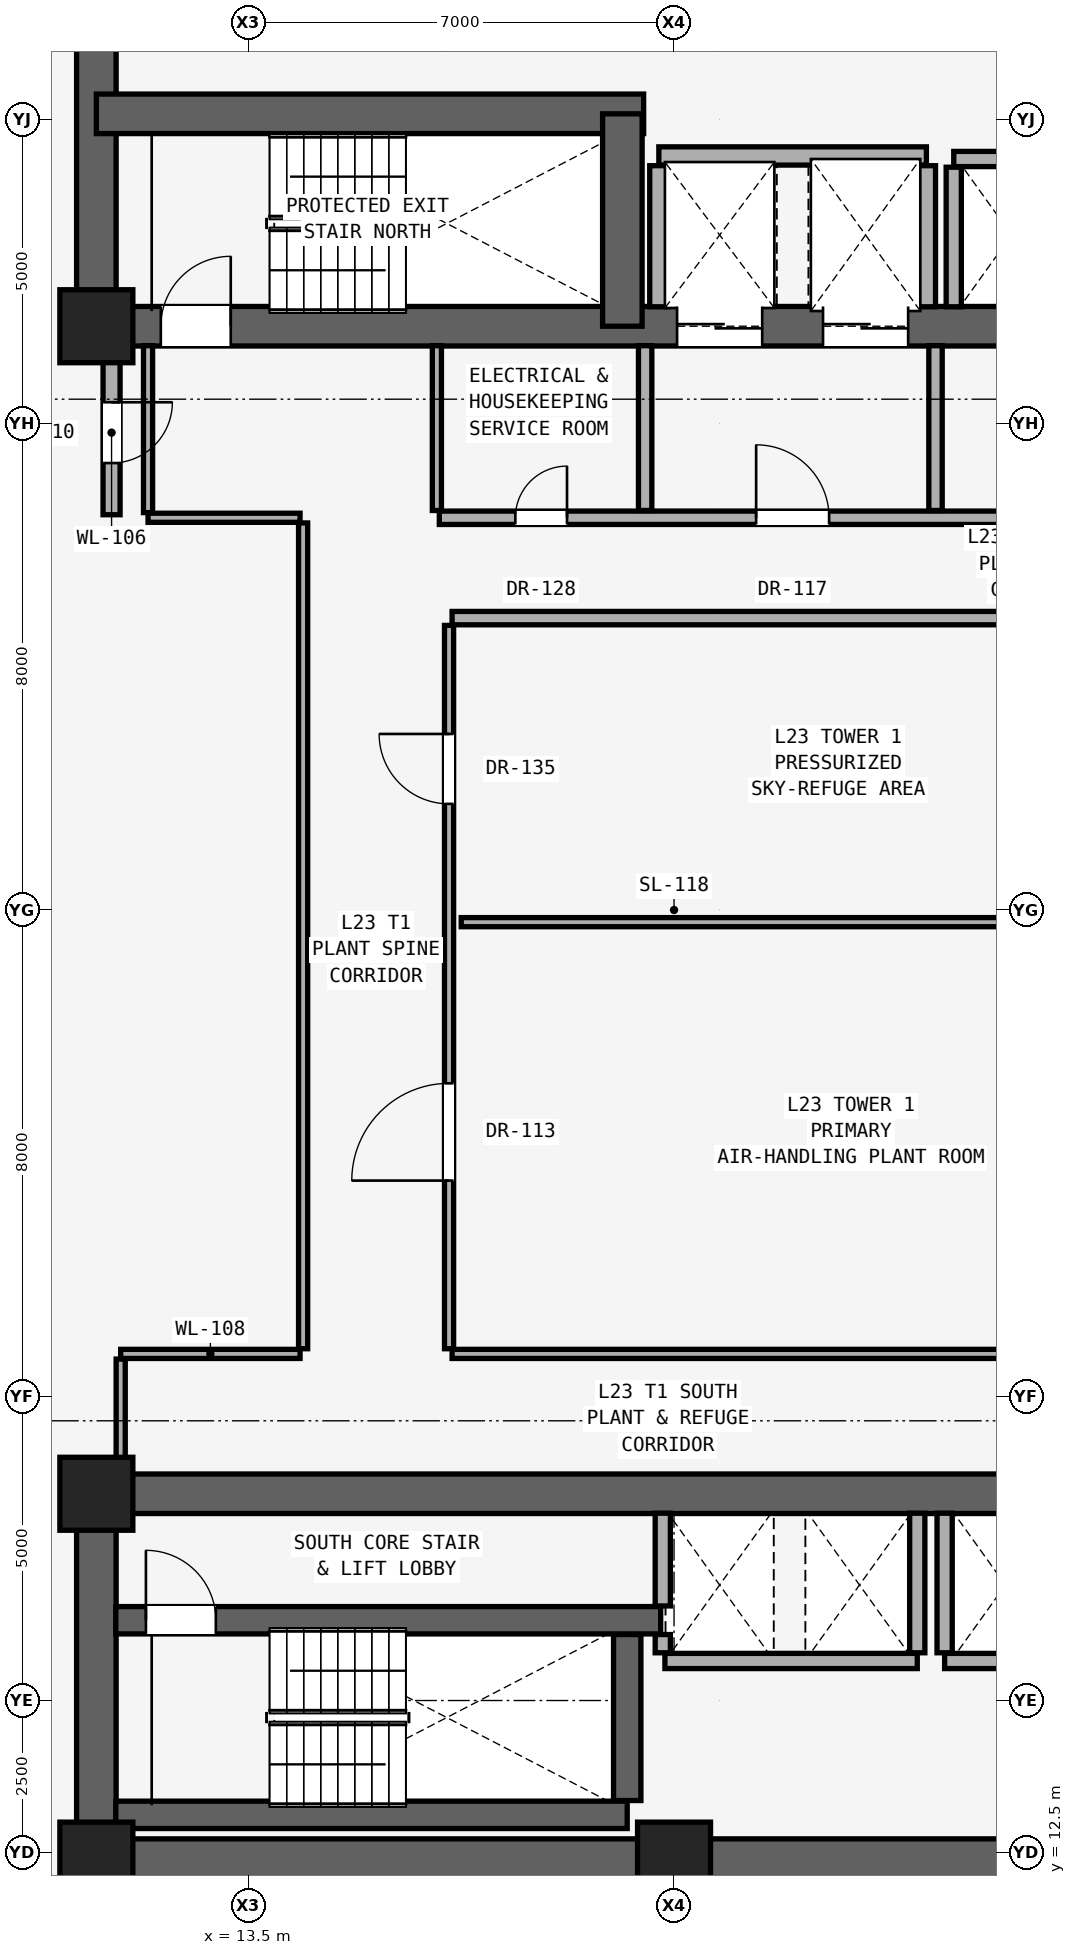
"""IFC4 building model, lengths in metres.
Left out: names, types, materials, properties, quantities, classifications, styles, units other than length and angle.
Written with IfcOpenShell. Run it as: python <this file> out.ifc"""

import sys

from ifc_helpers import new_model, si_unit, direction, frame, frame_2d, origin, origin_2d, place, context, subcontext, project, spatial, rectangle, extrude, element, fill, save


model = new_model("IFC4")
c1 = context("Model", 3, precision=1e-05, world=origin(), true_north=direction((0.0, 1.0)))
c2 = subcontext(c1, "Body", "Model", "MODEL_VIEW")
j1 = project(units=[si_unit("LENGTHUNIT", "METRE"), si_unit("PLANEANGLEUNIT", "RADIAN")], contexts=[c1])
p1 = place(None, origin())
s1 = spatial("IfcSite", under=j1, at=p1, CompositionType="ELEMENT")
p2 = place(p1, origin())
s2 = spatial("IfcBuilding", under=s1, at=p2, CompositionType="ELEMENT")
p3 = place(p2, frame((0.0, 0.0, 81.8)))
s3 = spatial("IfcBuildingStorey", under=s2, at=p3, CompositionType="ELEMENT", Elevation=81.8)
for number, where, z_axis, x_axis in (
    (1, (11.0, 12.4, 0.0), (0.0, 0.0, 1.0), (1.0, 0.0, 0.0)),
    (2, (20.5, 12.4, 0.0), (0.0, 0.0, 1.0), (1.0, 0.0, 0.0)),
    (3, (11.0, 18.4, 0.0), (0.0, 0.0, 1.0), (1.0, 0.0, 0.0)),
    (4, (11.0, 37.6, 0.0), (0.0, 0.0, 1.0), (1.0, 0.0, 0.0)),
):
    element("IfcColumn", number, at=place(p3, frame(where, z_axis=z_axis, x_axis=x_axis)), inside=s3, PredefinedType="COLUMN", context=c2, shape_type="SweptSolid", body=[
        extrude(rectangle(XDim=1.2, YDim=1.2, at=origin_2d()), origin(), (0.0, 0.0, 1.0), 6.6),
    ])
p4 = place(p3, frame((11.0, 37.6, 0.0), z_axis=(0.0, 0.0, 1.0), x_axis=(0.0, 1.0, 0.0)))
e5 = element("IfcWall", 5, at=p4, inside=s3, PredefinedType="SHEAR", context=c2, shape_type="SweptSolid", body=[
    extrude(rectangle(XDim=6.0, YDim=0.65, at=frame_2d((3.0, 0.0))), origin(), (0.0, 0.0, 1.0), 6.38),
])
p5 = place(p3, frame((11.0, 37.6, 0.0), z_axis=(0.0, 0.0, 1.0), x_axis=(1.0, 0.0, 0.0)))
e6 = element("IfcWall", 6, at=p5, inside=s3, PredefinedType="SHEAR", context=c2, shape_type="SweptSolid", body=[
    extrude(rectangle(XDim=19.0, YDim=0.65, at=frame_2d((9.5, 0.0))), origin(), (0.0, 0.0, 1.0), 6.38),
])
p6 = place(p5, frame((1.06, 0.0, 0.0)))
e7 = element("IfcOpeningElement", 7, at=p6, cuts=e6, PredefinedType="OPENING", context=c2, shape_type="SweptSolid", body=[
    extrude(rectangle(XDim=1.15, YDim=2.2, at=frame_2d((0.575, 1.1))), frame((0.0, 0.335, 0.0), z_axis=(0.0, -1.0, 0.0), x_axis=(1.0, 0.0, 0.0)), (0.0, 0.0, 1.0), 0.67),
])
p7 = place(p5, frame((9.55, 0.0, 0.0)))
e8 = element("IfcOpeningElement", 8, at=p7, cuts=e6, PredefinedType="OPENING", context=c2, shape_type="SweptSolid", body=[
    extrude(rectangle(XDim=1.4, YDim=2.35, at=frame_2d((0.7, 1.175))), frame((0.0, 0.335, 0.0), z_axis=(0.0, -1.0, 0.0), x_axis=(1.0, 0.0, 0.0)), (0.0, 0.0, 1.0), 0.67),
])
p8 = place(p5, frame((11.95, 0.0, 0.0)))
e9 = element("IfcOpeningElement", 9, at=p8, cuts=e6, PredefinedType="OPENING", context=c2, shape_type="SweptSolid", body=[
    extrude(rectangle(XDim=1.4, YDim=2.35, at=frame_2d((0.7, 1.175))), frame((0.0, 0.335, 0.0), z_axis=(0.0, -1.0, 0.0), x_axis=(1.0, 0.0, 0.0)), (0.0, 0.0, 1.0), 0.67),
])
p9 = place(p3, frame((11.0, 41.093, 0.0), z_axis=(0.0, 0.0, 1.0), x_axis=(1.0, 0.0, 0.0)))
e10 = element("IfcWall", 10, at=p9, inside=s3, PredefinedType="SHEAR", context=c2, shape_type="SweptSolid", body=[
    extrude(rectangle(XDim=9.0, YDim=0.65, at=frame_2d((4.5, 0.0))), origin(), (0.0, 0.0, 1.0), 6.38),
])
p10 = place(p3, frame((19.65, 37.6, 0.0), z_axis=(0.0, 0.0, 1.0), x_axis=(0.0, 1.0, 0.0)))
e11 = element("IfcWall", 11, at=p10, inside=s3, PredefinedType="SHEAR", context=c2, shape_type="SweptSolid", body=[
    extrude(rectangle(XDim=3.493, YDim=0.65, at=frame_2d((1.747, 0.0))), origin(), (0.0, 0.0, 1.0), 6.38),
])
p11 = place(p3, frame((11.0, 12.4, 0.0), z_axis=(0.0, 0.0, 1.0), x_axis=(1.0, 0.0, 0.0)))
e12 = element("IfcWall", 12, at=p11, inside=s3, PredefinedType="SHEAR", context=c2, shape_type="SweptSolid", body=[
    extrude(rectangle(XDim=19.0, YDim=0.65, at=frame_2d((9.5, 0.0))), origin(), (0.0, 0.0, 1.0), 6.38),
])
p12 = place(p3, frame((11.0, 12.4, 0.0), z_axis=(0.0, 0.0, 1.0), x_axis=(0.0, 1.0, 0.0)))
e13 = element("IfcWall", 13, at=p12, inside=s3, PredefinedType="SHEAR", context=c2, shape_type="SweptSolid", body=[
    extrude(rectangle(XDim=6.0, YDim=0.65, at=frame_2d((3.0, 0.0))), origin(), (0.0, 0.0, 1.0), 6.38),
])
p13 = place(p3, frame((11.0, 18.4, 0.0), z_axis=(0.0, 0.0, 1.0), x_axis=(1.0, 0.0, 0.0)))
e14 = element("IfcWall", 14, at=p13, inside=s3, PredefinedType="SHEAR", context=c2, shape_type="SweptSolid", body=[
    extrude(rectangle(XDim=19.0, YDim=0.65, at=frame_2d((9.5, 0.0))), origin(), (0.0, 0.0, 1.0), 6.38),
])
p14 = place(p3, frame((11.25, 37.2, 0.0), z_axis=(0.0, 0.0, 1.0), x_axis=(0.0, -1.0, 0.0)))
e15 = element("IfcWall", 15, at=p14, inside=s3, PredefinedType="SOLIDWALL", context=c2, shape_type="SweptSolid", body=[
    extrude(rectangle(XDim=2.7, YDim=0.28, at=frame_2d((1.35, 0.0))), origin(), (0.0, 0.0, 1.0), 4.93),
])
p15 = place(p14, frame((0.85, 0.0, 0.0)))
e16 = element("IfcOpeningElement", 16, at=p15, cuts=e15, PredefinedType="OPENING", context=c2, shape_type="SweptSolid", body=[
    extrude(rectangle(XDim=1.0, YDim=2.15, at=frame_2d((0.5, 1.075))), frame((0.0, 0.15, 0.0), z_axis=(0.0, -1.0, 0.0), x_axis=(1.0, 0.0, 0.0)), (0.0, 0.0, 1.0), 0.3),
])
p16 = place(p3, frame((11.32, 13.12, 0.0), z_axis=(0.0, 0.0, 1.0), x_axis=(1.0, 0.0, 0.0)))
e17 = element("IfcWall", 17, at=p16, inside=s3, PredefinedType="SHEAR", context=c2, shape_type="SweptSolid", body=[
    extrude(rectangle(XDim=8.41, YDim=0.45, at=frame_2d((4.205, 0.0))), origin(), (0.0, 0.0, 1.0), 6.38),
])
p17 = place(p3, frame((20.35, 15.65, 0.0), z_axis=(0.0, 0.0, 1.0), x_axis=(1.0, 0.0, 0.0)))
e18 = element("IfcWall", 18, at=p17, inside=s3, PredefinedType="SOLIDWALL", context=c2, shape_type="SweptSolid", body=[
    extrude(rectangle(XDim=4.15, YDim=0.25, at=frame_2d((2.075, 0.0))), origin(), (0.0, 0.0, 1.0), 6.38),
])
p18 = place(p3, frame((24.95, 15.65, 0.0), z_axis=(0.0, 0.0, 1.0), x_axis=(1.0, 0.0, 0.0)))
e19 = element("IfcWall", 19, at=p18, inside=s3, PredefinedType="SOLIDWALL", context=c2, shape_type="SweptSolid", body=[
    extrude(rectangle(XDim=4.25, YDim=0.25, at=frame_2d((2.125, 0.0))), origin(), (0.0, 0.0, 1.0), 6.38),
])
p19 = place(p3, frame((11.32, 16.32, 0.0), z_axis=(0.0, 0.0, 1.0), x_axis=(1.0, 0.0, 0.0)))
e20 = element("IfcWall", 20, at=p19, inside=s3, PredefinedType="SHEAR", context=c2, shape_type="SweptSolid", body=[
    extrude(rectangle(XDim=8.96, YDim=0.45, at=frame_2d((4.48, 0.0))), origin(), (0.0, 0.0, 1.0), 6.38),
])
p20 = place(p19, frame((0.495, 0.0, 0.0)))
e21 = element("IfcOpeningElement", 21, at=p20, cuts=e20, PredefinedType="OPENING", context=c2, shape_type="SweptSolid", body=[
    extrude(rectangle(XDim=1.15, YDim=2.2, at=frame_2d((0.575, 1.1))), frame((0.0, 0.235, 0.0), z_axis=(0.0, -1.0, 0.0), x_axis=(1.0, 0.0, 0.0)), (0.0, 0.0, 1.0), 0.47),
])
p21 = place(p3, frame((11.4, 20.7, 0.0), z_axis=(0.0, 0.0, 1.0), x_axis=(1.0, 0.0, 0.0)))
e22 = element("IfcWall", 22, at=p21, inside=s3, PredefinedType="PARTITIONING", context=c2, shape_type="SweptSolid", body=[
    extrude(rectangle(XDim=2.95, YDim=0.15, at=frame_2d((1.475, 0.0))), origin(), (0.0, 0.0, 1.0), 6.38),
])
p22 = place(p3, frame((16.85, 20.7, 0.0), z_axis=(0.0, 0.0, 1.0), x_axis=(1.0, 0.0, 0.0)))
e23 = element("IfcWall", 23, at=p22, inside=s3, PredefinedType="PARTITIONING", context=c2, shape_type="SweptSolid", body=[
    extrude(rectangle(XDim=12.55, YDim=0.15, at=frame_2d((6.275, 0.0))), origin(), (0.0, 0.0, 1.0), 5.909),
])
p23 = place(p3, frame((17.0, 27.8, 0.0), z_axis=(0.0, 0.0, 1.0), x_axis=(1.0, 0.0, 0.0)))
e24 = element("IfcWall", 24, at=p23, inside=s3, PredefinedType="PARTITIONING", context=c2, shape_type="SweptSolid", body=[
    extrude(rectangle(XDim=12.4, YDim=0.15, at=frame_2d((6.2, 0.0))), origin(), (0.0, 0.0, 1.0), 5.909),
])
p24 = place(p3, frame((16.85, 32.8, 0.0), z_axis=(0.0, 0.0, 1.0), x_axis=(1.0, 0.0, 0.0)))
e25 = element("IfcWall", 25, at=p24, inside=s3, PredefinedType="SOLIDWALL", context=c2, shape_type="SweptSolid", body=[
    extrude(rectangle(XDim=12.55, YDim=0.22, at=frame_2d((6.275, 0.0))), origin(), (0.0, 0.0, 1.0), 5.909),
])
p25 = place(p3, frame((11.85, 34.45, 0.0), z_axis=(0.0, 0.0, 1.0), x_axis=(1.0, 0.0, 0.0)))
e26 = element("IfcWall", 26, at=p25, inside=s3, PredefinedType="PARTITIONING", context=c2, shape_type="SweptSolid", body=[
    extrude(rectangle(XDim=2.5, YDim=0.15, at=frame_2d((1.25, 0.0))), origin(), (0.0, 0.0, 1.0), 6.38),
])
p26 = place(p3, frame((16.64, 34.45, 0.0), z_axis=(0.0, 0.0, 1.0), x_axis=(1.0, 0.0, 0.0)))
e27 = element("IfcWall", 27, at=p26, inside=s3, PredefinedType="SOLIDWALL", context=c2, shape_type="SweptSolid", body=[
    extrude(rectangle(XDim=12.76, YDim=0.22, at=frame_2d((6.38, 0.0))), origin(), (0.0, 0.0, 1.0), 5.909),
])
p27 = place(p26, frame((5.21, 0.0, 0.0)))
e28 = element("IfcOpeningElement", 28, at=p27, cuts=e27, PredefinedType="OPENING", context=c2, shape_type="SweptSolid", body=[
    extrude(rectangle(XDim=1.2, YDim=2.25, at=frame_2d((0.6, 1.125))), frame((0.0, 0.12, 0.0), z_axis=(0.0, -1.0, 0.0), x_axis=(1.0, 0.0, 0.0)), (0.0, 0.0, 1.0), 0.24),
])
p28 = place(p26, frame((1.25, 0.0, 0.0)))
e29 = element("IfcOpeningElement", 29, at=p28, cuts=e27, PredefinedType="OPENING", context=c2, shape_type="SweptSolid", body=[
    extrude(rectangle(XDim=0.85, YDim=2.01, at=frame_2d((0.425, 1.005))), frame((0.0, 0.12, 0.0), z_axis=(0.0, -1.0, 0.0), x_axis=(1.0, 0.0, 0.0)), (0.0, 0.0, 1.0), 0.24),
])
p29 = place(p3, frame((25.1, 40.35, 0.0), z_axis=(0.0, 0.0, 1.0), x_axis=(1.0, 0.0, 0.0)))
e30 = element("IfcWall", 30, at=p29, inside=s3, PredefinedType="SOLIDWALL", context=c2, shape_type="SweptSolid", body=[
    extrude(rectangle(XDim=4.1, YDim=0.25, at=frame_2d((2.05, 0.0))), origin(), (0.0, 0.0, 1.0), 6.38),
])
p30 = place(p3, frame((20.25, 40.4, 0.0), z_axis=(0.0, 0.0, 1.0), x_axis=(1.0, 0.0, 0.0)))
e31 = element("IfcWall", 31, at=p30, inside=s3, PredefinedType="SOLIDWALL", context=c2, shape_type="SweptSolid", body=[
    extrude(rectangle(XDim=4.4, YDim=0.3, at=frame_2d((2.2, 0.0))), origin(), (0.0, 0.0, 1.0), 6.38),
])
p31 = place(p3, frame((11.4, 18.72, 0.0), z_axis=(0.0, 0.0, 1.0), x_axis=(0.0, 1.0, 0.0)))
e32 = element("IfcWall", 32, at=p31, inside=s3, PredefinedType="PARTITIONING", context=c2, shape_type="SweptSolid", body=[
    extrude(rectangle(XDim=1.895, YDim=0.15, at=frame_2d((0.948, 0.0))), origin(), (0.0, 0.0, 1.0), 6.38),
])
p32 = place(p3, frame((11.85, 34.535, 0.0), z_axis=(0.0, 0.0, 1.0), x_axis=(0.0, 1.0, 0.0)))
e33 = element("IfcWall", 33, at=p32, inside=s3, PredefinedType="PARTITIONING", context=c2, shape_type="SweptSolid", body=[
    extrude(rectangle(XDim=2.745, YDim=0.15, at=frame_2d((1.373, 0.0))), origin(), (0.0, 0.0, 1.0), 6.38),
])
p33 = place(p3, frame((14.4, 20.785, 0.0), z_axis=(0.0, 0.0, 1.0), x_axis=(0.0, 1.0, 0.0)))
e34 = element("IfcWall", 34, at=p33, inside=s3, PredefinedType="PARTITIONING", context=c2, shape_type="SweptSolid", body=[
    extrude(rectangle(XDim=13.58, YDim=0.15, at=frame_2d((6.79, 0.0))), origin(), (0.0, 0.0, 1.0), 5.424),
])
p34 = place(p3, frame((16.6, 34.57, 0.0), z_axis=(0.0, 0.0, 1.0), x_axis=(0.0, 1.0, 0.0)))
e35 = element("IfcWall", 35, at=p34, inside=s3, PredefinedType="PARTITIONING", context=c2, shape_type="SweptSolid", body=[
    extrude(rectangle(XDim=2.71, YDim=0.15, at=frame_2d((1.355, 0.0))), origin(), (0.0, 0.0, 1.0), 6.38),
])
p35 = place(p3, frame((16.8, 20.785, 0.0), z_axis=(0.0, 0.0, 1.0), x_axis=(0.0, 1.0, 0.0)))
e36 = element("IfcWall", 36, at=p35, inside=s3, PredefinedType="PARTITIONING", context=c2, shape_type="SweptSolid", body=[
    extrude(rectangle(XDim=11.895, YDim=0.15, at=frame_2d((5.948, 0.0))), origin(), (0.0, 0.0, 1.0), 5.424),
])
p36 = place(p35, frame((8.96, 0.0, 0.0)))
e37 = element("IfcOpeningElement", 37, at=p36, cuts=e36, PredefinedType="OPENING", context=c2, shape_type="SweptSolid", body=[
    extrude(rectangle(XDim=1.15, YDim=2.2, at=frame_2d((0.575, 1.1))), frame((0.0, 0.085, 0.0), z_axis=(0.0, -1.0, 0.0), x_axis=(1.0, 0.0, 0.0)), (0.0, 0.0, 1.0), 0.17),
])
p37 = place(p35, frame((2.765, 0.0, 0.0)))
e38 = element("IfcOpeningElement", 38, at=p37, cuts=e36, PredefinedType="OPENING", context=c2, shape_type="SweptSolid", body=[
    extrude(rectangle(XDim=1.6, YDim=2.3, at=frame_2d((0.8, 1.15))), frame((0.0, 0.085, 0.0), z_axis=(0.0, -1.0, 0.0), x_axis=(1.0, 0.0, 0.0)), (0.0, 0.0, 1.0), 0.17),
])
p38 = place(p3, frame((19.73, 13.355, 0.0), z_axis=(0.0, 0.0, 1.0), x_axis=(0.0, 1.0, 0.0)))
e39 = element("IfcWall", 39, at=p38, inside=s3, PredefinedType="SHEAR", context=c2, shape_type="SweptSolid", body=[
    extrude(rectangle(XDim=2.73, YDim=0.45, at=frame_2d((1.365, 0.0))), origin(), (0.0, 0.0, 1.0), 6.38),
])
p39 = place(p3, frame((20.025, 34.57, 0.0), z_axis=(0.0, 0.0, 1.0), x_axis=(0.0, 1.0, 0.0)))
e40 = element("IfcWall", 40, at=p39, inside=s3, PredefinedType="SOLIDWALL", context=c2, shape_type="SweptSolid", body=[
    extrude(rectangle(XDim=2.71, YDim=0.22, at=frame_2d((1.355, 0.0))), origin(), (0.0, 0.0, 1.0), 6.38),
])
p40 = place(p3, frame((20.315, 15.785, 0.0), z_axis=(0.0, 0.0, 1.0), x_axis=(0.0, 1.0, 0.0)))
e41 = element("IfcWall", 41, at=p40, inside=s3, PredefinedType="SOLIDWALL", context=c2, shape_type="SweptSolid", body=[
    extrude(rectangle(XDim=0.3, YDim=0.25, at=frame_2d((0.15, 0.0))), origin(), (0.0, 0.0, 1.0), 6.38),
])
p41 = place(p3, frame((20.315, 16.555, 0.0), z_axis=(0.0, 0.0, 1.0), x_axis=(0.0, 1.0, 0.0)))
e42 = element("IfcWall", 42, at=p41, inside=s3, PredefinedType="SOLIDWALL", context=c2, shape_type="SweptSolid", body=[
    extrude(rectangle(XDim=1.525, YDim=0.25, at=frame_2d((0.763, 0.0))), origin(), (0.0, 0.0, 1.0), 6.38),
])
p42 = place(p3, frame((20.25, 37.92, 0.0), z_axis=(0.0, 0.0, 1.0), x_axis=(0.0, 1.0, 0.0)))
e43 = element("IfcWall", 43, at=p42, inside=s3, PredefinedType="SOLIDWALL", context=c2, shape_type="SweptSolid", body=[
    extrude(rectangle(XDim=2.32, YDim=0.3, at=frame_2d((1.16, 0.0))), origin(), (0.0, 0.0, 1.0), 6.38),
])
p43 = place(p3, frame((24.5, 15.785, 0.0), z_axis=(0.0, 0.0, 1.0), x_axis=(0.0, 1.0, 0.0)))
e44 = element("IfcWall", 44, at=p43, inside=s3, PredefinedType="SOLIDWALL", context=c2, shape_type="SweptSolid", body=[
    extrude(rectangle(XDim=2.295, YDim=0.25, at=frame_2d((1.147, 0.0))), origin(), (0.0, 0.0, 1.0), 6.38),
])
p44 = place(p3, frame((24.65, 37.92, 0.0), z_axis=(0.0, 0.0, 1.0), x_axis=(0.0, 1.0, 0.0)))
e45 = element("IfcWall", 45, at=p44, inside=s3, PredefinedType="SOLIDWALL", context=c2, shape_type="SweptSolid", body=[
    extrude(rectangle(XDim=2.32, YDim=0.3, at=frame_2d((1.16, 0.0))), origin(), (0.0, 0.0, 1.0), 6.38),
])
p45 = place(p3, frame((24.95, 15.785, 0.0), z_axis=(0.0, 0.0, 1.0), x_axis=(0.0, 1.0, 0.0)))
e46 = element("IfcWall", 46, at=p45, inside=s3, PredefinedType="SOLIDWALL", context=c2, shape_type="SweptSolid", body=[
    extrude(rectangle(XDim=2.295, YDim=0.25, at=frame_2d((1.147, 0.0))), origin(), (0.0, 0.0, 1.0), 6.38),
])
p46 = place(p3, frame((24.8, 34.57, 0.0), z_axis=(0.0, 0.0, 1.0), x_axis=(0.0, 1.0, 0.0)))
e47 = element("IfcWall", 47, at=p46, inside=s3, PredefinedType="SOLIDWALL", context=c2, shape_type="SweptSolid", body=[
    extrude(rectangle(XDim=2.71, YDim=0.22, at=frame_2d((1.355, 0.0))), origin(), (0.0, 0.0, 1.0), 6.38),
])
p47 = place(p3, frame((25.1, 37.92, 0.0), z_axis=(0.0, 0.0, 1.0), x_axis=(0.0, 1.0, 0.0)))
e48 = element("IfcWall", 48, at=p47, inside=s3, PredefinedType="SOLIDWALL", context=c2, shape_type="SweptSolid", body=[
    extrude(rectangle(XDim=2.295, YDim=0.25, at=frame_2d((1.147, 0.0))), origin(), (0.0, 0.0, 1.0), 6.38),
])
p48 = place(p15, origin())
e49 = element("IfcDoor", 49, at=p48, inside=s3, OperationType="SINGLE_SWING_LEFT", PredefinedType="DOOR", context=c2, shape_type="SweptSolid", body=[
    extrude(rectangle(XDim=1.0, YDim=2.15, at=frame_2d((0.5, 1.075))), frame((0.0, 0.025, 0.0), z_axis=(0.0, -1.0, 0.0), x_axis=(1.0, 0.0, 0.0)), (0.0, 0.0, 1.0), 0.05),
])
fill(e16, e49)
p49 = place(p6, origin())
e50 = element("IfcDoor", 50, at=p49, inside=s3, OperationType="SINGLE_SWING_RIGHT", PredefinedType="DOOR", context=c2, shape_type="SweptSolid", body=[
    extrude(rectangle(XDim=1.15, YDim=2.2, at=frame_2d((0.575, 1.1))), frame((0.0, 0.025, 0.0), z_axis=(0.0, -1.0, 0.0), x_axis=(1.0, 0.0, 0.0)), (0.0, 0.0, 1.0), 0.05),
])
fill(e7, e50)
p50 = place(p27, origin())
e51 = element("IfcDoor", 51, at=p50, inside=s3, OperationType="SINGLE_SWING_LEFT", PredefinedType="DOOR", context=c2, shape_type="SweptSolid", body=[
    extrude(rectangle(XDim=1.2, YDim=2.25, at=frame_2d((0.6, 1.125))), frame((0.0, 0.025, 0.0), z_axis=(0.0, -1.0, 0.0), x_axis=(1.0, 0.0, 0.0)), (0.0, 0.0, 1.0), 0.05),
])
fill(e28, e51)
p51 = place(p28, origin())
e52 = element("IfcDoor", 52, at=p51, inside=s3, OperationType="SINGLE_SWING_RIGHT", PredefinedType="DOOR", context=c2, shape_type="SweptSolid", body=[
    extrude(rectangle(XDim=0.85, YDim=2.01, at=frame_2d((0.425, 1.005))), frame((0.0, 0.025, 0.0), z_axis=(0.0, -1.0, 0.0), x_axis=(1.0, 0.0, 0.0)), (0.0, 0.0, 1.0), 0.05),
])
fill(e29, e52)
p52 = place(p20, origin())
e53 = element("IfcDoor", 53, at=p52, inside=s3, OperationType="SINGLE_SWING_LEFT", PredefinedType="DOOR", context=c2, shape_type="SweptSolid", body=[
    extrude(rectangle(XDim=1.15, YDim=2.2, at=frame_2d((0.575, 1.1))), frame((0.0, 0.025, 0.0), z_axis=(0.0, -1.0, 0.0), x_axis=(1.0, 0.0, 0.0)), (0.0, 0.0, 1.0), 0.05),
])
fill(e21, e53)
p53 = place(p36, origin())
e54 = element("IfcDoor", 54, at=p53, inside=s3, OperationType="SINGLE_SWING_RIGHT", PredefinedType="DOOR", context=c2, shape_type="SweptSolid", body=[
    extrude(rectangle(XDim=1.15, YDim=2.2, at=frame_2d((0.575, 1.1))), frame((0.0, 0.025, 0.0), z_axis=(0.0, -1.0, 0.0), x_axis=(1.0, 0.0, 0.0)), (0.0, 0.0, 1.0), 0.05),
])
fill(e37, e54)
p54 = place(p37, origin())
e55 = element("IfcDoor", 55, at=p54, inside=s3, OperationType="SINGLE_SWING_LEFT", PredefinedType="DOOR", context=c2, shape_type="SweptSolid", body=[
    extrude(rectangle(XDim=1.6, YDim=2.3, at=frame_2d((0.8, 1.15))), frame((0.0, 0.025, 0.0), z_axis=(0.0, -1.0, 0.0), x_axis=(1.0, 0.0, 0.0)), (0.0, 0.0, 1.0), 0.05),
])
fill(e38, e55)
p55 = place(p7, origin())
e56 = element("IfcDoor", 56, at=p55, inside=s3, OperationType="DOUBLE_DOOR_SLIDING", PredefinedType="DOOR", context=c2, shape_type="SweptSolid", body=[
    extrude(rectangle(XDim=1.4, YDim=2.35, at=frame_2d((0.7, 1.175))), frame((0.0, 0.025, 0.0), z_axis=(0.0, -1.0, 0.0), x_axis=(1.0, 0.0, 0.0)), (0.0, 0.0, 1.0), 0.05),
])
fill(e8, e56)
p56 = place(p8, origin())
e57 = element("IfcDoor", 57, at=p56, inside=s3, OperationType="DOUBLE_DOOR_SLIDING", PredefinedType="DOOR", context=c2, shape_type="SweptSolid", body=[
    extrude(rectangle(XDim=1.4, YDim=2.35, at=frame_2d((0.7, 1.175))), frame((0.0, 0.025, 0.0), z_axis=(0.0, -1.0, 0.0), x_axis=(1.0, 0.0, 0.0)), (0.0, 0.0, 1.0), 0.05),
])
fill(e9, e57)
save(model, sys.argv[1])
